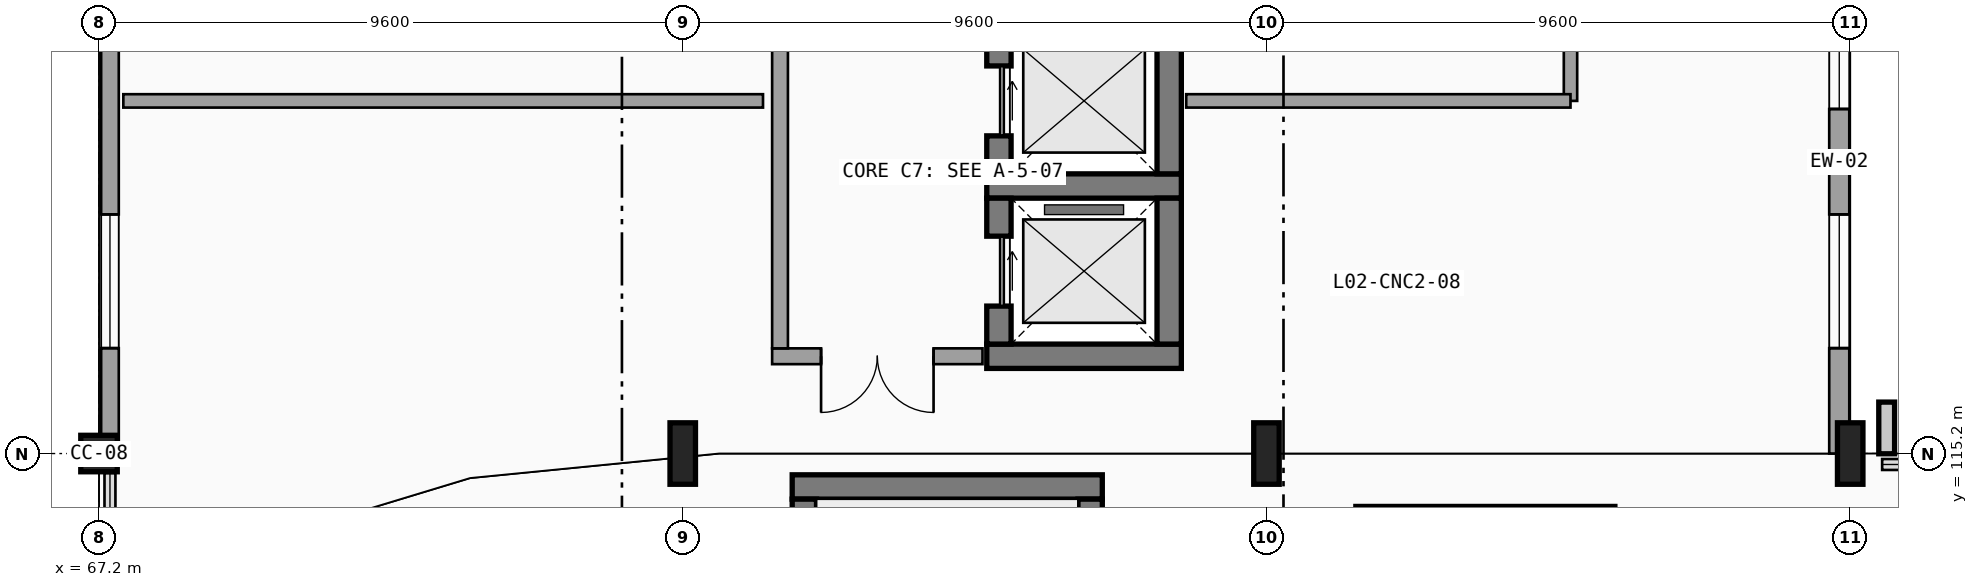
"""IFC4 building model, lengths in metres.
Left out: names, types, materials, properties, quantities, classifications, styles, units other than length and angle.
Written with IfcOpenShell. Run it as: python <this file> out.ifc"""

import sys

from ifc_helpers import new_model, si_unit, direction, frame, frame_2d, origin, origin_2d, place, context, subcontext, project, spatial, rectangle, i_section, extrude, element, fill, save


model = new_model("IFC4")
c1 = context("Model", 3, precision=1e-05, world=origin(), true_north=direction((0.0, 1.0)))
c2 = subcontext(c1, "Body", "Model", "MODEL_VIEW")
j1 = project(units=[si_unit("LENGTHUNIT", "METRE"), si_unit("PLANEANGLEUNIT", "RADIAN")], contexts=[c1])
p1 = place(None, origin())
s1 = spatial("IfcSite", under=j1, at=p1, CompositionType="ELEMENT")
p2 = place(p1, origin())
s2 = spatial("IfcBuilding", under=s1, at=p2, CompositionType="ELEMENT")
p3 = place(p2, frame((0.0, 0.0, 9.6)))
s3 = spatial("IfcBuildingStorey", under=s2, at=p3, CompositionType="ELEMENT", Elevation=9.6)
p4 = place(p3, frame((67.2, 115.2, 0.0), z_axis=(0.0, 0.0, 1.0), x_axis=(1.0, 0.0, 0.0)))
e1 = element("IfcColumn", 1, at=p4, inside=s3, PredefinedType="COLUMN", context=c2, shape_type="SweptSolid", body=[
    extrude(rectangle(XDim=0.6, YDim=0.6, at=origin_2d()), origin(), (0.0, 0.0, 1.0), 4.5),
])
for number, where, z_axis, x_axis in (
    (2, (76.8, 115.2, 0.0), (0.0, 0.0, 1.0), (1.0, 0.0, 0.0)),
    (3, (86.4, 115.2, 0.0), (0.0, 0.0, 1.0), (1.0, 0.0, 0.0)),
    (4, (96.0, 115.2, 0.0), (0.0, 0.0, 1.0), (1.0, 0.0, 0.0)),
):
    element("IfcColumn", number, at=place(p3, frame(where, z_axis=z_axis, x_axis=x_axis)), inside=s3, PredefinedType="COLUMN", context=c2, shape_type="SweptSolid", body=[
        extrude(i_section(OverallWidth=0.419, OverallDepth=1.011, WebThickness=0.024, FlangeThickness=0.042, FilletRadius=0.031, at=origin_2d()), origin(), (0.0, 0.0, 1.0), 4.5),
    ])
p5 = place(p3, frame((67.38, 124.8, 0.0), z_axis=(0.0, 0.0, 1.0), x_axis=(0.0, -1.0, 0.0)))
e5 = element("IfcWall", 5, at=p5, inside=s3, PredefinedType="SOLIDWALL", context=c2, shape_type="SweptSolid", body=[
    extrude(rectangle(XDim=9.6, YDim=0.29, at=frame_2d((4.8, 0.0))), origin(), (0.0, 0.0, 1.0), 3.613),
])
p6 = place(p5, frame((7.867, 0.0, 0.95), z_axis=(0.0, 0.0, 1.0), x_axis=(-1.0, 0.0, 0.0)))
e6 = element("IfcOpeningElement", 6, at=p6, cuts=e5, PredefinedType="OPENING", context=c2, shape_type="SweptSolid", body=[
    extrude(rectangle(XDim=2.2, YDim=2.1, at=frame_2d((1.1, 1.05))), frame((0.0, 0.155, 0.0), z_axis=(0.0, -1.0, 0.0), x_axis=(1.0, 0.0, 0.0)), (0.0, 0.0, 1.0), 0.31),
])
p7 = place(p3, frame((95.82, 115.2, 0.0), z_axis=(0.0, 0.0, 1.0), x_axis=(0.0, 1.0, 0.0)))
e7 = element("IfcWall", 7, at=p7, inside=s3, PredefinedType="SOLIDWALL", context=c2, shape_type="SweptSolid", body=[
    extrude(rectangle(XDim=9.6, YDim=0.33, at=frame_2d((4.8, 0.0))), origin(), (0.0, 0.0, 1.0), 3.293),
])
p8 = place(p7, frame((3.933, 0.0, 0.95), z_axis=(0.0, 0.0, 1.0), x_axis=(-1.0, 0.0, 0.0)))
e8 = element("IfcOpeningElement", 8, at=p8, cuts=e7, PredefinedType="OPENING", context=c2, shape_type="SweptSolid", body=[
    extrude(rectangle(XDim=2.2, YDim=2.1, at=frame_2d((1.1, 1.05))), frame((0.0, 0.175, 0.0), z_axis=(0.0, -1.0, 0.0), x_axis=(1.0, 0.0, 0.0)), (0.0, 0.0, 1.0), 0.35),
])
p9 = place(p7, frame((7.867, 0.0, 0.95), z_axis=(0.0, 0.0, 1.0), x_axis=(-1.0, 0.0, 0.0)))
e9 = element("IfcOpeningElement", 9, at=p9, cuts=e7, PredefinedType="OPENING", context=c2, shape_type="SweptSolid", body=[
    extrude(rectangle(XDim=2.2, YDim=2.1, at=frame_2d((1.1, 1.05))), frame((0.0, 0.175, 0.0), z_axis=(0.0, -1.0, 0.0), x_axis=(1.0, 0.0, 0.0)), (0.0, 0.0, 1.0), 0.35),
])
for number, where, z_axis, x_axis in (
    (10, (81.8, 116.8, 0.0), (0.0, 0.0, 1.0), (1.0, 0.0, 0.0)),
    (11, (85.0, 119.6, 0.0), (0.0, 0.0, 1.0), (-1.0, 0.0, 0.0)),
):
    element("IfcWall", number, at=place(p3, frame(where, z_axis=z_axis, x_axis=x_axis)), inside=s3, PredefinedType="SHEAR", context=c2, shape_type="SweptSolid", body=[
        extrude(rectangle(XDim=3.2, YDim=0.4, at=frame_2d((1.6, 0.0))), origin(), (0.0, 0.0, 1.0), 4.22),
    ])
p10 = place(p3, frame((82.0, 119.4, 0.0), z_axis=(0.0, 0.0, 1.0), x_axis=(0.0, -1.0, 0.0)))
e12 = element("IfcWall", 12, at=p10, inside=s3, PredefinedType="SHEAR", context=c2, shape_type="SweptSolid", body=[
    extrude(rectangle(XDim=2.4, YDim=0.4, at=frame_2d((1.2, 0.0))), origin(), (0.0, 0.0, 1.0), 4.22),
])
p11 = place(p10, frame((0.625, 0.0, 0.0), z_axis=(0.0, 0.0, 1.0), x_axis=(1.0, 0.0, 0.0)))
e13 = element("IfcOpeningElement", 13, at=p11, cuts=e12, PredefinedType="OPENING", context=c2, shape_type="SweptSolid", body=[
    extrude(rectangle(XDim=1.15, YDim=2.2, at=frame_2d((0.575, 1.1))), frame((0.0, 0.21, 0.0), z_axis=(0.0, -1.0, 0.0), x_axis=(1.0, 0.0, 0.0)), (0.0, 0.0, 1.0), 0.42),
])
p12 = place(p3, frame((84.8, 117.0, 0.0), z_axis=(0.0, 0.0, 1.0), x_axis=(0.0, 1.0, 0.0)))
e14 = element("IfcWall", 14, at=p12, inside=s3, PredefinedType="SHEAR", context=c2, shape_type="SweptSolid", body=[
    extrude(rectangle(XDim=2.4, YDim=0.4, at=frame_2d((1.2, 0.0))), origin(), (0.0, 0.0, 1.0), 4.22),
])
p13 = place(p3, frame((82.0, 122.2, 0.0), z_axis=(0.0, 0.0, 1.0), x_axis=(0.0, -1.0, 0.0)))
e15 = element("IfcWall", 15, at=p13, inside=s3, PredefinedType="SHEAR", context=c2, shape_type="SweptSolid", body=[
    extrude(rectangle(XDim=2.4, YDim=0.4, at=frame_2d((1.2, 0.0))), origin(), (0.0, 0.0, 1.0), 4.22),
])
p14 = place(p13, frame((0.625, 0.0, 0.0), z_axis=(0.0, 0.0, 1.0), x_axis=(1.0, 0.0, 0.0)))
e16 = element("IfcOpeningElement", 16, at=p14, cuts=e15, PredefinedType="OPENING", context=c2, shape_type="SweptSolid", body=[
    extrude(rectangle(XDim=1.15, YDim=2.2, at=frame_2d((0.575, 1.1))), frame((0.0, 0.21, 0.0), z_axis=(0.0, -1.0, 0.0), x_axis=(1.0, 0.0, 0.0)), (0.0, 0.0, 1.0), 0.42),
])
p15 = place(p3, frame((84.8, 119.8, 0.0), z_axis=(0.0, 0.0, 1.0), x_axis=(0.0, 1.0, 0.0)))
e17 = element("IfcWall", 17, at=p15, inside=s3, PredefinedType="SHEAR", context=c2, shape_type="SweptSolid", body=[
    extrude(rectangle(XDim=2.4, YDim=0.4, at=frame_2d((1.2, 0.0))), origin(), (0.0, 0.0, 1.0), 4.22),
])
p16 = place(p3, frame((78.27, 116.8, 0.0), z_axis=(0.0, 0.0, 1.0), x_axis=(1.0, 0.0, 0.0)))
e18 = element("IfcWall", 18, at=p16, inside=s3, PredefinedType="SOLIDWALL", context=c2, shape_type="SweptSolid", body=[
    extrude(rectangle(XDim=3.46, YDim=0.26, at=frame_2d((1.73, 0.0))), origin(), (0.0, 0.0, 1.0), 4.22),
])
p17 = place(p16, frame((2.655, 0.0, 0.0), z_axis=(0.0, 0.0, 1.0), x_axis=(-1.0, 0.0, 0.0)))
e19 = element("IfcOpeningElement", 19, at=p17, cuts=e18, PredefinedType="OPENING", context=c2, shape_type="SweptSolid", body=[
    extrude(rectangle(XDim=1.85, YDim=2.25, at=frame_2d((0.925, 1.125))), frame((0.0, 0.14, 0.0), z_axis=(0.0, -1.0, 0.0), x_axis=(1.0, 0.0, 0.0)), (0.0, 0.0, 1.0), 0.28),
])
p18 = place(p3, frame((78.4, 122.27, 0.0), z_axis=(0.0, 0.0, 1.0), x_axis=(0.0, -1.0, 0.0)))
e20 = element("IfcWall", 20, at=p18, inside=s3, PredefinedType="SOLIDWALL", context=c2, shape_type="SweptSolid", body=[
    extrude(rectangle(XDim=5.34, YDim=0.26, at=frame_2d((2.67, 0.0))), origin(), (0.0, 0.0, 1.0), 4.22),
])
p19 = place(p3, frame((83.7, 114.65, 0.0), z_axis=(0.0, 0.0, 1.0), x_axis=(-1.0, 0.0, 0.0)))
e21 = element("IfcWall", 21, at=p19, inside=s3, PredefinedType="SHEAR", context=c2, shape_type="SweptSolid", body=[
    extrude(rectangle(XDim=5.1, YDim=0.4, at=frame_2d((2.55, 0.0))), origin(), (0.0, 0.0, 1.0), 4.22),
])
for number, where, z_axis, x_axis in (
    (22, (78.8, 114.45, 0.0), (0.0, 0.0, 1.0), (0.0, -1.0, 0.0)),
    (23, (83.5, 106.3, 0.0), (0.0, 0.0, 1.0), (0.0, 1.0, 0.0)),
):
    element("IfcWall", number, at=place(p3, frame(where, z_axis=z_axis, x_axis=x_axis)), inside=s3, PredefinedType="SHEAR", context=c2, shape_type="SweptSolid", body=[
        extrude(rectangle(XDim=8.15, YDim=0.4, at=frame_2d((4.075, 0.0))), origin(), (0.0, 0.0, 1.0), 4.22),
    ])
p20 = place(p3, frame((92.13, 114.13, 0.0), z_axis=(0.0, 0.0, 1.0), x_axis=(-1.0, 0.0, 0.0)))
e24 = element("IfcWall", 24, at=p20, inside=s3, PredefinedType="SHEAR", context=c2, shape_type="SweptSolid", body=[
    extrude(rectangle(XDim=4.26, YDim=0.4, at=frame_2d((2.13, 0.0))), origin(), (0.0, 0.0, 1.0), 4.22),
])
p21 = place(p3, frame((91.4, 143.6, 0.0), z_axis=(0.0, 0.0, 1.0), x_axis=(0.0, -1.0, 0.0)))
e25 = element("IfcWall", 25, at=p21, inside=s3, PredefinedType="PARTITIONING", context=c2, shape_type="SweptSolid", body=[
    extrude(rectangle(XDim=22.6, YDim=0.22, at=frame_2d((11.3, 0.0))), origin(), (0.0, 0.0, 1.0), 3.466),
])
p22 = place(p21, frame((10.325, 0.0, 0.0), z_axis=(0.0, 0.0, 1.0), x_axis=(1.0, 0.0, 0.0)))
e26 = element("IfcOpeningElement", 26, at=p22, cuts=e25, PredefinedType="OPENING", context=c2, shape_type="SweptSolid", body=[
    extrude(rectangle(XDim=1.95, YDim=2.35, at=frame_2d((0.975, 1.175))), frame((0.0, 0.12, 0.0), z_axis=(0.0, -1.0, 0.0), x_axis=(1.0, 0.0, 0.0)), (0.0, 0.0, 1.0), 0.24),
])
p23 = place(p3, frame((91.4, 121.0, 0.0), z_axis=(0.0, 0.0, 1.0), x_axis=(-1.0, 0.0, 0.0)))
e27 = element("IfcWall", 27, at=p23, inside=s3, PredefinedType="PARTITIONING", context=c2, shape_type="SweptSolid", body=[
    extrude(rectangle(XDim=6.32, YDim=0.22, at=frame_2d((3.16, 0.0))), origin(), (0.0, 0.0, 1.0), 3.613),
])
p24 = place(p3, frame((78.12, 121.0, 0.0), z_axis=(0.0, 0.0, 1.0), x_axis=(-1.0, 0.0, 0.0)))
e28 = element("IfcWall", 28, at=p24, inside=s3, PredefinedType="PARTITIONING", context=c2, shape_type="SweptSolid", body=[
    extrude(rectangle(XDim=10.52, YDim=0.22, at=frame_2d((5.26, 0.0))), origin(), (0.0, 0.0, 1.0), 3.613),
])
p25 = place(p6, origin())
e29 = element("IfcWindow", 29, at=p25, inside=s3, PartitioningType="SINGLE_PANEL", PredefinedType="WINDOW", context=c2, shape_type="SweptSolid", body=[
    extrude(rectangle(XDim=2.2, YDim=2.1, at=frame_2d((1.1, 1.05))), frame((0.0, 0.03, 0.0), z_axis=(0.0, -1.0, 0.0), x_axis=(1.0, 0.0, 0.0)), (0.0, 0.0, 1.0), 0.06),
])
fill(e6, e29)
p26 = place(p8, origin())
e30 = element("IfcWindow", 30, at=p26, inside=s3, PartitioningType="SINGLE_PANEL", PredefinedType="WINDOW", context=c2, shape_type="SweptSolid", body=[
    extrude(rectangle(XDim=2.2, YDim=2.1, at=frame_2d((1.1, 1.05))), frame((0.0, 0.03, 0.0), z_axis=(0.0, -1.0, 0.0), x_axis=(1.0, 0.0, 0.0)), (0.0, 0.0, 1.0), 0.06),
])
fill(e8, e30)
p27 = place(p9, origin())
e31 = element("IfcWindow", 31, at=p27, inside=s3, PartitioningType="SINGLE_PANEL", PredefinedType="WINDOW", context=c2, shape_type="SweptSolid", body=[
    extrude(rectangle(XDim=2.2, YDim=2.1, at=frame_2d((1.1, 1.05))), frame((0.0, 0.03, 0.0), z_axis=(0.0, -1.0, 0.0), x_axis=(1.0, 0.0, 0.0)), (0.0, 0.0, 1.0), 0.06),
])
fill(e9, e31)
p28 = place(p11, origin())
e32 = element("IfcDoor", 32, at=p28, inside=s3, OperationType="SLIDING_TO_LEFT", PredefinedType="DOOR", context=c2, shape_type="SweptSolid", body=[
    extrude(rectangle(XDim=1.15, YDim=2.2, at=frame_2d((0.575, 1.1))), frame((0.0, 0.025, 0.0), z_axis=(0.0, -1.0, 0.0), x_axis=(1.0, 0.0, 0.0)), (0.0, 0.0, 1.0), 0.05),
])
fill(e13, e32)
p29 = place(p14, origin())
e33 = element("IfcDoor", 33, at=p29, inside=s3, OperationType="SLIDING_TO_LEFT", PredefinedType="DOOR", context=c2, shape_type="SweptSolid", body=[
    extrude(rectangle(XDim=1.15, YDim=2.2, at=frame_2d((0.575, 1.1))), frame((0.0, 0.025, 0.0), z_axis=(0.0, -1.0, 0.0), x_axis=(1.0, 0.0, 0.0)), (0.0, 0.0, 1.0), 0.05),
])
fill(e16, e33)
p30 = place(p17, origin())
e34 = element("IfcDoor", 34, at=p30, inside=s3, OperationType="DOUBLE_DOOR_SINGLE_SWING", PredefinedType="DOOR", context=c2, shape_type="SweptSolid", body=[
    extrude(rectangle(XDim=1.85, YDim=2.25, at=frame_2d((0.925, 1.125))), frame((0.0, 0.025, 0.0), z_axis=(0.0, -1.0, 0.0), x_axis=(1.0, 0.0, 0.0)), (0.0, 0.0, 1.0), 0.05),
])
fill(e19, e34)
save(model, sys.argv[1])
